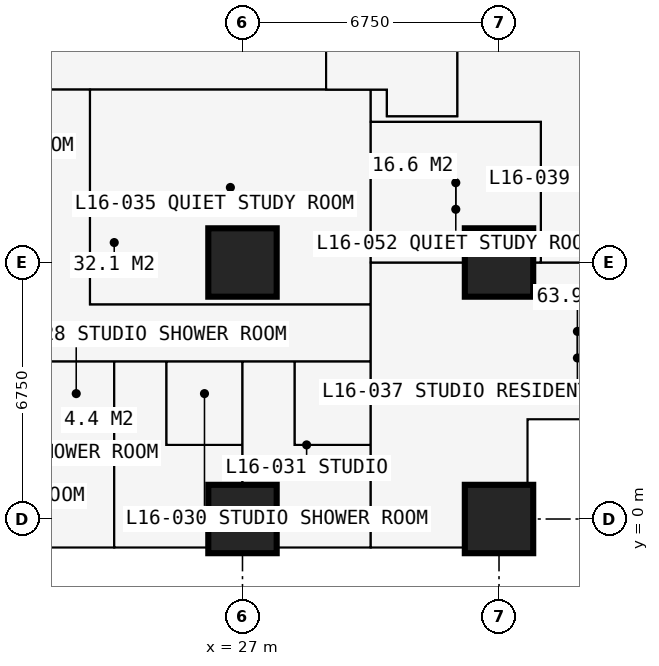
"""IFC4 building model, lengths in metres.
Left out: names, types, materials, properties, quantities, classifications, styles, units other than length and angle.
Written with IfcOpenShell. Run it as: python <this file> out.ifc"""

import sys

from ifc_helpers import new_model, si_unit, direction, frame, frame_2d, origin, origin_2d, place, context, subcontext, project, spatial, rectangle, extrude, element, fill, save


model = new_model("IFC4")
c1 = context("Model", 3, precision=1e-05, world=origin(), true_north=direction((0.0, 1.0)))
c2 = subcontext(c1, "Body", "Model", "MODEL_VIEW")
j1 = project(units=[si_unit("LENGTHUNIT", "METRE"), si_unit("PLANEANGLEUNIT", "RADIAN")], contexts=[c1])
p1 = place(None, origin())
s1 = spatial("IfcSite", under=j1, at=p1, CompositionType="ELEMENT")
p2 = place(p1, origin())
s2 = spatial("IfcBuilding", under=s1, at=p2, CompositionType="ELEMENT")
p3 = place(p2, frame((0.0, 0.0, 61.2)))
s3 = spatial("IfcBuildingStorey", under=s2, at=p3, CompositionType="ELEMENT", Elevation=61.2)
for number, where, z_axis, x_axis in (
    (1, (27.0, 0.0, 0.0), (0.0, 0.0, 1.0), (1.0, 0.0, 0.0)),
    (2, (27.0, 6.75, 0.0), (0.0, 0.0, 1.0), (1.0, 0.0, 0.0)),
    (3, (33.75, 0.0, 0.0), (0.0, 0.0, 1.0), (1.0, 0.0, 0.0)),
    (4, (33.75, 6.75, 0.0), (0.0, 0.0, 1.0), (1.0, 0.0, 0.0)),
):
    element("IfcColumn", number, at=place(p3, frame(where, z_axis=z_axis, x_axis=x_axis)), inside=s3, PredefinedType="COLUMN", context=c2, shape_type="SweptSolid", body=[
        extrude(rectangle(XDim=1.8, YDim=1.8, at=origin_2d()), origin(), (0.0, 0.0, 1.0), 3.6),
    ])
p4 = place(p3, frame((34.5, -0.75, 0.0), z_axis=(0.0, 0.0, 1.0), x_axis=(0.0, 1.0, 0.0)))
e5 = element("IfcWall", 5, at=p4, inside=s3, PredefinedType="SOLIDWALL", context=c2, shape_type="SweptSolid", body=[
    extrude(rectangle(XDim=3.375, YDim=0.3, at=frame_2d((1.688, 0.0))), origin(), (0.0, 0.0, 1.0), 3.375),
])
p5 = place(p4, frame((1.833, 0.0, 0.9)))
e6 = element("IfcOpeningElement", 6, at=p5, cuts=e5, PredefinedType="OPENING", context=c2, shape_type="SweptSolid", body=[
    extrude(rectangle(XDim=1.2, YDim=1.8, at=frame_2d((0.6, 0.9))), frame((0.0, 0.16, 0.0), z_axis=(0.0, -1.0, 0.0), x_axis=(1.0, 0.0, 0.0)), (0.0, 0.0, 1.0), 0.32),
])
p6 = place(p3, frame((34.5, 2.625, 0.0), z_axis=(0.0, 0.0, 1.0), x_axis=(1.0, 0.0, 0.0)))
e7 = element("IfcWall", 7, at=p6, inside=s3, PredefinedType="SOLIDWALL", context=c2, shape_type="SweptSolid", body=[
    extrude(rectangle(XDim=3.375, YDim=0.3, at=frame_2d((1.688, 0.0))), origin(), (0.0, 0.0, 1.0), 3.375),
])
p7 = place(p6, frame((0.788, 0.0, 0.6)))
e8 = element("IfcOpeningElement", 8, at=p7, cuts=e7, PredefinedType="OPENING", context=c2, shape_type="SweptSolid", body=[
    extrude(rectangle(XDim=1.8, YDim=2.1, at=frame_2d((0.9, 1.05))), frame((0.0, 0.16, 0.0), z_axis=(0.0, -1.0, 0.0), x_axis=(1.0, 0.0, 0.0)), (0.0, 0.0, 1.0), 0.32),
])
p8 = place(p3, frame((6.75, 4.15, 0.0), z_axis=(0.0, 0.0, 1.0), x_axis=(1.0, 0.0, 0.0)))
e9 = element("IfcWall", 9, at=p8, inside=s3, PredefinedType="PARTITIONING", context=c2, shape_type="SweptSolid", body=[
    extrude(rectangle(XDim=23.625, YDim=0.1, at=frame_2d((11.812, 0.0))), origin(), (0.0, 0.0, 1.0), 3.375),
])
p9 = place(p8, frame((0.2, 0.0, 0.0)))
e10 = element("IfcOpeningElement", 10, at=p9, cuts=e9, PredefinedType="OPENING", context=c2, shape_type="SweptSolid", body=[
    extrude(rectangle(XDim=0.95, YDim=2.2, at=frame_2d((0.475, 1.1))), frame((0.0, 0.06, 0.0), z_axis=(0.0, -1.0, 0.0), x_axis=(1.0, 0.0, 0.0)), (0.0, 0.0, 1.0), 0.12),
])
p10 = place(p8, frame((3.625, 0.0, 0.0)))
e11 = element("IfcOpeningElement", 11, at=p10, cuts=e9, PredefinedType="OPENING", context=c2, shape_type="SweptSolid", body=[
    extrude(rectangle(XDim=0.95, YDim=2.2, at=frame_2d((0.475, 1.1))), frame((0.0, 0.06, 0.0), z_axis=(0.0, -1.0, 0.0), x_axis=(1.0, 0.0, 0.0)), (0.0, 0.0, 1.0), 0.12),
])
p11 = place(p8, frame((7.0, 0.0, 0.0)))
e12 = element("IfcOpeningElement", 12, at=p11, cuts=e9, PredefinedType="OPENING", context=c2, shape_type="SweptSolid", body=[
    extrude(rectangle(XDim=0.95, YDim=2.2, at=frame_2d((0.475, 1.1))), frame((0.0, 0.06, 0.0), z_axis=(0.0, -1.0, 0.0), x_axis=(1.0, 0.0, 0.0)), (0.0, 0.0, 1.0), 0.12),
])
p12 = place(p8, frame((10.325, 0.0, 0.0)))
e13 = element("IfcOpeningElement", 13, at=p12, cuts=e9, PredefinedType="OPENING", context=c2, shape_type="SweptSolid", body=[
    extrude(rectangle(XDim=0.95, YDim=2.2, at=frame_2d((0.475, 1.1))), frame((0.0, 0.06, 0.0), z_axis=(0.0, -1.0, 0.0), x_axis=(1.0, 0.0, 0.0)), (0.0, 0.0, 1.0), 0.12),
])
p13 = place(p8, frame((13.75, 0.0, 0.0)))
e14 = element("IfcOpeningElement", 14, at=p13, cuts=e9, PredefinedType="OPENING", context=c2, shape_type="SweptSolid", body=[
    extrude(rectangle(XDim=0.95, YDim=2.2, at=frame_2d((0.475, 1.1))), frame((0.0, 0.06, 0.0), z_axis=(0.0, -1.0, 0.0), x_axis=(1.0, 0.0, 0.0)), (0.0, 0.0, 1.0), 0.12),
])
p14 = place(p8, frame((17.125, 0.0, 0.0)))
e15 = element("IfcOpeningElement", 15, at=p14, cuts=e9, PredefinedType="OPENING", context=c2, shape_type="SweptSolid", body=[
    extrude(rectangle(XDim=0.95, YDim=2.2, at=frame_2d((0.475, 1.1))), frame((0.0, 0.06, 0.0), z_axis=(0.0, -1.0, 0.0), x_axis=(1.0, 0.0, 0.0)), (0.0, 0.0, 1.0), 0.12),
])
p15 = place(p8, frame((20.5, 0.0, 0.0)))
e16 = element("IfcOpeningElement", 16, at=p15, cuts=e9, PredefinedType="OPENING", context=c2, shape_type="SweptSolid", body=[
    extrude(rectangle(XDim=0.95, YDim=2.2, at=frame_2d((0.475, 1.1))), frame((0.0, 0.06, 0.0), z_axis=(0.0, -1.0, 0.0), x_axis=(1.0, 0.0, 0.0)), (0.0, 0.0, 1.0), 0.12),
])
p16 = place(p3, frame((10.125, 11.3, 0.0), z_axis=(0.0, 0.0, 1.0), x_axis=(1.0, 0.0, 0.0)))
e17 = element("IfcWall", 17, at=p16, inside=s3, PredefinedType="PARTITIONING", context=c2, shape_type="SweptSolid", body=[
    extrude(rectangle(XDim=20.675, YDim=0.15, at=frame_2d((10.337, 0.0))), origin(), (0.0, 0.0, 1.0), 3.375),
])
p17 = place(p16, frame((5.2, 0.0, 0.0)))
e18 = element("IfcOpeningElement", 18, at=p17, cuts=e17, PredefinedType="OPENING", context=c2, shape_type="SweptSolid", body=[
    extrude(rectangle(XDim=1.0, YDim=2.2, at=frame_2d((0.5, 1.1))), frame((0.0, 0.085, 0.0), z_axis=(0.0, -1.0, 0.0), x_axis=(1.0, 0.0, 0.0)), (0.0, 0.0, 1.0), 0.17),
])
p18 = place(p16, frame((11.312, 0.0, 0.0)))
e19 = element("IfcOpeningElement", 19, at=p18, cuts=e17, PredefinedType="OPENING", context=c2, shape_type="SweptSolid", body=[
    extrude(rectangle(XDim=1.0, YDim=2.2, at=frame_2d((0.5, 1.1))), frame((0.0, 0.085, 0.0), z_axis=(0.0, -1.0, 0.0), x_axis=(1.0, 0.0, 0.0)), (0.0, 0.0, 1.0), 0.17),
])
p19 = place(p16, frame((2.425, 0.0, 0.0)))
e20 = element("IfcOpeningElement", 20, at=p19, cuts=e17, PredefinedType="OPENING", context=c2, shape_type="SweptSolid", body=[
    extrude(rectangle(XDim=0.95, YDim=2.2, at=frame_2d((0.475, 1.1))), frame((0.0, 0.085, 0.0), z_axis=(0.0, -1.0, 0.0), x_axis=(1.0, 0.0, 0.0)), (0.0, 0.0, 1.0), 0.17),
])
p20 = place(p3, frame((21.625, 1.95, 0.0), z_axis=(0.0, 0.0, 1.0), x_axis=(1.0, 0.0, 0.0)))
e21 = element("IfcWall", 21, at=p20, inside=s3, PredefinedType="PARTITIONING", context=c2, shape_type="SweptSolid", body=[
    extrude(rectangle(XDim=2.0, YDim=0.1, at=frame_2d((1.0, 0.0))), origin(), (0.0, 0.0, 1.0), 3.375),
])
p21 = place(p3, frame((22.988, 5.65, 0.0), z_axis=(0.0, 0.0, 1.0), x_axis=(1.0, 0.0, 0.0)))
e22 = element("IfcWall", 22, at=p21, inside=s3, PredefinedType="PARTITIONING", context=c2, shape_type="SweptSolid", body=[
    extrude(rectangle(XDim=7.387, YDim=0.15, at=frame_2d((3.694, 0.0))), origin(), (0.0, 0.0, 1.0), 3.375),
])
p22 = place(p21, frame((2.15, 0.0, 0.0)))
e23 = element("IfcOpeningElement", 23, at=p22, cuts=e22, PredefinedType="OPENING", context=c2, shape_type="SweptSolid", body=[
    extrude(rectangle(XDim=0.95, YDim=2.2, at=frame_2d((0.475, 1.1))), frame((0.0, 0.085, 0.0), z_axis=(0.0, -1.0, 0.0), x_axis=(1.0, 0.0, 0.0)), (0.0, 0.0, 1.0), 0.17),
])
p23 = place(p3, frame((22.988, 5.65, 0.0), z_axis=(0.0, 0.0, 1.0), x_axis=(0.0, 1.0, 0.0)))
e24 = element("IfcWall", 24, at=p23, inside=s3, PredefinedType="PARTITIONING", context=c2, shape_type="SweptSolid", body=[
    extrude(rectangle(XDim=5.65, YDim=0.15, at=frame_2d((2.825, 0.0))), origin(), (0.0, 0.0, 1.0), 3.375),
])
p24 = place(p3, frame((23.625, -0.734, 0.0), z_axis=(0.0, 0.0, 1.0), x_axis=(0.0, 1.0, 0.0)))
e25 = element("IfcWall", 25, at=p24, inside=s3, PredefinedType="PARTITIONING", context=c2, shape_type="SweptSolid", body=[
    extrude(rectangle(XDim=4.884, YDim=0.175, at=frame_2d((2.442, 0.0))), origin(), (0.0, 0.0, 1.0), 3.375),
])
p25 = place(p3, frame((25.0, 1.95, 0.0), z_axis=(0.0, 0.0, 1.0), x_axis=(0.0, 1.0, 0.0)))
e26 = element("IfcWall", 26, at=p25, inside=s3, PredefinedType="PARTITIONING", context=c2, shape_type="SweptSolid", body=[
    extrude(rectangle(XDim=2.2, YDim=0.1, at=frame_2d((1.1, 0.0))), origin(), (0.0, 0.0, 1.0), 3.375),
])
p26 = place(p25, frame((0.65, 0.0, 0.0)))
e27 = element("IfcOpeningElement", 27, at=p26, cuts=e26, PredefinedType="OPENING", context=c2, shape_type="SweptSolid", body=[
    extrude(rectangle(XDim=0.9, YDim=2.2, at=frame_2d((0.45, 1.1))), frame((0.0, 0.06, 0.0), z_axis=(0.0, -1.0, 0.0), x_axis=(1.0, 0.0, 0.0)), (0.0, 0.0, 1.0), 0.12),
])
p27 = place(p3, frame((25.0, 1.95, 0.0), z_axis=(0.0, 0.0, 1.0), x_axis=(1.0, 0.0, 0.0)))
e28 = element("IfcWall", 28, at=p27, inside=s3, PredefinedType="PARTITIONING", context=c2, shape_type="SweptSolid", body=[
    extrude(rectangle(XDim=2.0, YDim=0.1, at=frame_2d((1.0, 0.0))), origin(), (0.0, 0.0, 1.0), 3.375),
])
p28 = place(p3, frame((27.0, -0.734, 0.0), z_axis=(0.0, 0.0, 1.0), x_axis=(0.0, 1.0, 0.0)))
e29 = element("IfcWall", 29, at=p28, inside=s3, PredefinedType="PARTITIONING", context=c2, shape_type="SweptSolid", body=[
    extrude(rectangle(XDim=4.884, YDim=0.175, at=frame_2d((2.442, 0.0))), origin(), (0.0, 0.0, 1.0), 2.61),
])
p29 = place(p3, frame((28.375, 1.95, 0.0), z_axis=(0.0, 0.0, 1.0), x_axis=(0.0, 1.0, 0.0)))
e30 = element("IfcWall", 30, at=p29, inside=s3, PredefinedType="PARTITIONING", context=c2, shape_type="SweptSolid", body=[
    extrude(rectangle(XDim=2.2, YDim=0.1, at=frame_2d((1.1, 0.0))), origin(), (0.0, 0.0, 1.0), 3.375),
])
p30 = place(p29, frame((0.65, 0.0, 0.0)))
e31 = element("IfcOpeningElement", 31, at=p30, cuts=e30, PredefinedType="OPENING", context=c2, shape_type="SweptSolid", body=[
    extrude(rectangle(XDim=0.9, YDim=2.2, at=frame_2d((0.45, 1.1))), frame((0.0, 0.06, 0.0), z_axis=(0.0, -1.0, 0.0), x_axis=(1.0, 0.0, 0.0)), (0.0, 0.0, 1.0), 0.12),
])
p31 = place(p3, frame((28.375, 1.95, 0.0), z_axis=(0.0, 0.0, 1.0), x_axis=(1.0, 0.0, 0.0)))
e32 = element("IfcWall", 32, at=p31, inside=s3, PredefinedType="PARTITIONING", context=c2, shape_type="SweptSolid", body=[
    extrude(rectangle(XDim=2.0, YDim=0.1, at=frame_2d((1.0, 0.0))), origin(), (0.0, 0.0, 1.0), 3.375),
])
p32 = place(p3, frame((29.2, 11.3, 0.0), z_axis=(0.0, 0.0, 1.0), x_axis=(0.0, 1.0, 0.0)))
e33 = element("IfcWall", 33, at=p32, inside=s3, PredefinedType="PARTITIONING", context=c2, shape_type="SweptSolid", body=[
    extrude(rectangle(XDim=17.9, YDim=0.2, at=frame_2d((8.95, 0.0))), origin(), (0.0, 0.0, 1.0), 3.375),
])
p33 = place(p32, frame((8.35, 0.0, 0.0)))
e34 = element("IfcOpeningElement", 34, at=p33, cuts=e33, PredefinedType="OPENING", context=c2, shape_type="SweptSolid", body=[
    extrude(rectangle(XDim=1.2, YDim=2.2, at=frame_2d((0.6, 1.1))), frame((0.0, 0.11, 0.0), z_axis=(0.0, -1.0, 0.0), x_axis=(1.0, 0.0, 0.0)), (0.0, 0.0, 1.0), 0.22),
])
p34 = place(p3, frame((30.375, -0.734, 0.0), z_axis=(0.0, 0.0, 1.0), x_axis=(0.0, 1.0, 0.0)))
e35 = element("IfcWall", 35, at=p34, inside=s3, PredefinedType="PARTITIONING", context=c2, shape_type="SweptSolid", body=[
    extrude(rectangle(XDim=12.034, YDim=0.15, at=frame_2d((6.017, 0.0))), origin(), (0.0, 0.0, 1.0), 3.375),
])
p35 = place(p34, frame((5.134, 0.0, 0.0)))
e36 = element("IfcOpeningElement", 36, at=p35, cuts=e35, PredefinedType="OPENING", context=c2, shape_type="SweptSolid", body=[
    extrude(rectangle(XDim=1.0, YDim=2.2, at=frame_2d((0.5, 1.1))), frame((0.0, 0.085, 0.0), z_axis=(0.0, -1.0, 0.0), x_axis=(1.0, 0.0, 0.0)), (0.0, 0.0, 1.0), 0.17),
])
p36 = place(p3, frame((30.375, 6.75, 0.0), z_axis=(0.0, 0.0, 1.0), x_axis=(1.0, 0.0, 0.0)))
e37 = element("IfcWall", 37, at=p36, inside=s3, PredefinedType="PARTITIONING", context=c2, shape_type="SweptSolid", body=[
    extrude(rectangle(XDim=5.975, YDim=0.15, at=frame_2d((2.988, 0.0))), origin(), (0.0, 0.0, 1.0), 2.877),
])
p37 = place(p3, frame((30.375, 10.45, 0.0), z_axis=(0.0, 0.0, 1.0), x_axis=(1.0, 0.0, 0.0)))
e38 = element("IfcWall", 38, at=p37, inside=s3, PredefinedType="PARTITIONING", context=c2, shape_type="SweptSolid", body=[
    extrude(rectangle(XDim=4.475, YDim=0.15, at=frame_2d((2.238, 0.0))), origin(), (0.0, 0.0, 1.0), 3.375),
])
p38 = place(p37, frame((2.35, 0.0, 0.0)))
e39 = element("IfcOpeningElement", 39, at=p38, cuts=e38, PredefinedType="OPENING", context=c2, shape_type="SweptSolid", body=[
    extrude(rectangle(XDim=0.95, YDim=2.2, at=frame_2d((0.475, 1.1))), frame((0.0, 0.085, 0.0), z_axis=(0.0, -1.0, 0.0), x_axis=(1.0, 0.0, 0.0)), (0.0, 0.0, 1.0), 0.17),
])
p39 = place(p3, frame((30.8, 10.6, 0.0), z_axis=(0.0, 0.0, 1.0), x_axis=(0.0, 1.0, 0.0)))
e40 = element("IfcWall", 40, at=p39, inside=s3, PredefinedType="PARTITIONING", context=c2, shape_type="SweptSolid", body=[
    extrude(rectangle(XDim=0.7, YDim=0.15, at=frame_2d((0.35, 0.0))), origin(), (0.0, 0.0, 1.0), 3.375),
])
p40 = place(p3, frame((30.8, 10.6, 0.0), z_axis=(0.0, 0.0, 1.0), x_axis=(1.0, 0.0, 0.0)))
e41 = element("IfcWall", 41, at=p40, inside=s3, PredefinedType="PARTITIONING", context=c2, shape_type="SweptSolid", body=[
    extrude(rectangle(XDim=1.85, YDim=0.15, at=frame_2d((0.925, 0.0))), origin(), (0.0, 0.0, 1.0), 3.375),
])
p41 = place(p3, frame((32.65, 10.6, 0.0), z_axis=(0.0, 0.0, 1.0), x_axis=(0.0, 1.0, 0.0)))
e42 = element("IfcWall", 42, at=p41, inside=s3, PredefinedType="SHEAR", context=c2, shape_type="SweptSolid", body=[
    extrude(rectangle(XDim=9.3, YDim=0.1, at=frame_2d((4.65, 0.0))), origin(), (0.0, 0.0, 1.0), 3.375),
])
p42 = place(p41, frame((0.5, 0.0, 0.0)))
e43 = element("IfcOpeningElement", 43, at=p42, cuts=e42, PredefinedType="OPENING", context=c2, shape_type="SweptSolid", body=[
    extrude(rectangle(XDim=1.0, YDim=2.2, at=frame_2d((0.5, 1.1))), frame((0.0, 0.06, 0.0), z_axis=(0.0, -1.0, 0.0), x_axis=(1.0, 0.0, 0.0)), (0.0, 0.0, 1.0), 0.12),
])
p43 = place(p3, frame((34.85, 6.75, 0.0), z_axis=(0.0, 0.0, 1.0), x_axis=(0.0, 1.0, 0.0)))
e44 = element("IfcWall", 44, at=p43, inside=s3, PredefinedType="PARTITIONING", context=c2, shape_type="SweptSolid", body=[
    extrude(rectangle(XDim=3.7, YDim=0.15, at=frame_2d((1.85, 0.0))), origin(), (0.0, 0.0, 1.0), 3.375),
])
p44 = place(p5, origin())
e45 = element("IfcWindow", 45, at=p44, inside=s3, PartitioningType="SINGLE_PANEL", PredefinedType="WINDOW", context=c2, shape_type="SweptSolid", body=[
    extrude(rectangle(XDim=1.2, YDim=1.8, at=frame_2d((0.6, 0.9))), frame((0.0, 0.03, 0.0), z_axis=(0.0, -1.0, 0.0), x_axis=(1.0, 0.0, 0.0)), (0.0, 0.0, 1.0), 0.06),
])
fill(e6, e45)
p45 = place(p7, origin())
e46 = element("IfcWindow", 46, at=p45, inside=s3, PartitioningType="SINGLE_PANEL", PredefinedType="WINDOW", context=c2, shape_type="SweptSolid", body=[
    extrude(rectangle(XDim=1.8, YDim=2.1, at=frame_2d((0.9, 1.05))), frame((0.0, 0.03, 0.0), z_axis=(0.0, -1.0, 0.0), x_axis=(1.0, 0.0, 0.0)), (0.0, 0.0, 1.0), 0.06),
])
fill(e8, e46)
p46 = place(p14, origin())
e47 = element("IfcDoor", 47, at=p46, inside=s3, OperationType="SINGLE_SWING_LEFT", PredefinedType="DOOR", context=c2, shape_type="SweptSolid", body=[
    extrude(rectangle(XDim=0.95, YDim=2.2, at=frame_2d((0.475, 1.1))), frame((0.0, 0.025, 0.0), z_axis=(0.0, -1.0, 0.0), x_axis=(1.0, 0.0, 0.0)), (0.0, 0.0, 1.0), 0.05),
])
fill(e15, e47)
p47 = place(p26, origin())
e48 = element("IfcDoor", 48, at=p47, inside=s3, OperationType="SINGLE_SWING_RIGHT", PredefinedType="DOOR", context=c2, shape_type="SweptSolid", body=[
    extrude(rectangle(XDim=0.9, YDim=2.2, at=frame_2d((0.45, 1.1))), frame((0.0, 0.025, 0.0), z_axis=(0.0, -1.0, 0.0), x_axis=(1.0, 0.0, 0.0)), (0.0, 0.0, 1.0), 0.05),
])
fill(e27, e48)
p48 = place(p15, origin())
e49 = element("IfcDoor", 49, at=p48, inside=s3, OperationType="SINGLE_SWING_LEFT", PredefinedType="DOOR", context=c2, shape_type="SweptSolid", body=[
    extrude(rectangle(XDim=0.95, YDim=2.2, at=frame_2d((0.475, 1.1))), frame((0.0, 0.025, 0.0), z_axis=(0.0, -1.0, 0.0), x_axis=(1.0, 0.0, 0.0)), (0.0, 0.0, 1.0), 0.05),
])
fill(e16, e49)
p49 = place(p30, origin())
e50 = element("IfcDoor", 50, at=p49, inside=s3, OperationType="SINGLE_SWING_RIGHT", PredefinedType="DOOR", context=c2, shape_type="SweptSolid", body=[
    extrude(rectangle(XDim=0.9, YDim=2.2, at=frame_2d((0.45, 1.1))), frame((0.0, 0.025, 0.0), z_axis=(0.0, -1.0, 0.0), x_axis=(1.0, 0.0, 0.0)), (0.0, 0.0, 1.0), 0.05),
])
fill(e31, e50)
p50 = place(p18, origin())
e51 = element("IfcDoor", 51, at=p50, inside=s3, OperationType="SINGLE_SWING_LEFT", PredefinedType="DOOR", context=c2, shape_type="SweptSolid", body=[
    extrude(rectangle(XDim=1.0, YDim=2.2, at=frame_2d((0.5, 1.1))), frame((0.0, 0.025, 0.0), z_axis=(0.0, -1.0, 0.0), x_axis=(1.0, 0.0, 0.0)), (0.0, 0.0, 1.0), 0.05),
])
fill(e19, e51)
p51 = place(p22, origin())
e52 = element("IfcDoor", 52, at=p51, inside=s3, OperationType="SINGLE_SWING_LEFT", PredefinedType="DOOR", context=c2, shape_type="SweptSolid", body=[
    extrude(rectangle(XDim=0.95, YDim=2.2, at=frame_2d((0.475, 1.1))), frame((0.0, 0.025, 0.0), z_axis=(0.0, -1.0, 0.0), x_axis=(1.0, 0.0, 0.0)), (0.0, 0.0, 1.0), 0.05),
])
fill(e23, e52)
p52 = place(p35, origin())
e53 = element("IfcDoor", 53, at=p52, inside=s3, OperationType="SINGLE_SWING_LEFT", PredefinedType="DOOR", context=c2, shape_type="SweptSolid", body=[
    extrude(rectangle(XDim=1.0, YDim=2.2, at=frame_2d((0.5, 1.1))), frame((0.0, 0.025, 0.0), z_axis=(0.0, -1.0, 0.0), x_axis=(1.0, 0.0, 0.0)), (0.0, 0.0, 1.0), 0.05),
])
fill(e36, e53)
p53 = place(p42, origin())
e54 = element("IfcDoor", 54, at=p53, inside=s3, OperationType="SINGLE_SWING_LEFT", PredefinedType="DOOR", context=c2, shape_type="SweptSolid", body=[
    extrude(rectangle(XDim=1.0, YDim=2.2, at=frame_2d((0.5, 1.1))), frame((0.0, 0.025, 0.0), z_axis=(0.0, -1.0, 0.0), x_axis=(1.0, 0.0, 0.0)), (0.0, 0.0, 1.0), 0.05),
])
fill(e43, e54)
p54 = place(p38, origin())
e55 = element("IfcDoor", 55, at=p54, inside=s3, OperationType="SINGLE_SWING_LEFT", PredefinedType="DOOR", context=c2, shape_type="SweptSolid", body=[
    extrude(rectangle(XDim=0.95, YDim=2.2, at=frame_2d((0.475, 1.1))), frame((0.0, 0.025, 0.0), z_axis=(0.0, -1.0, 0.0), x_axis=(1.0, 0.0, 0.0)), (0.0, 0.0, 1.0), 0.05),
])
fill(e39, e55)
save(model, sys.argv[1])
